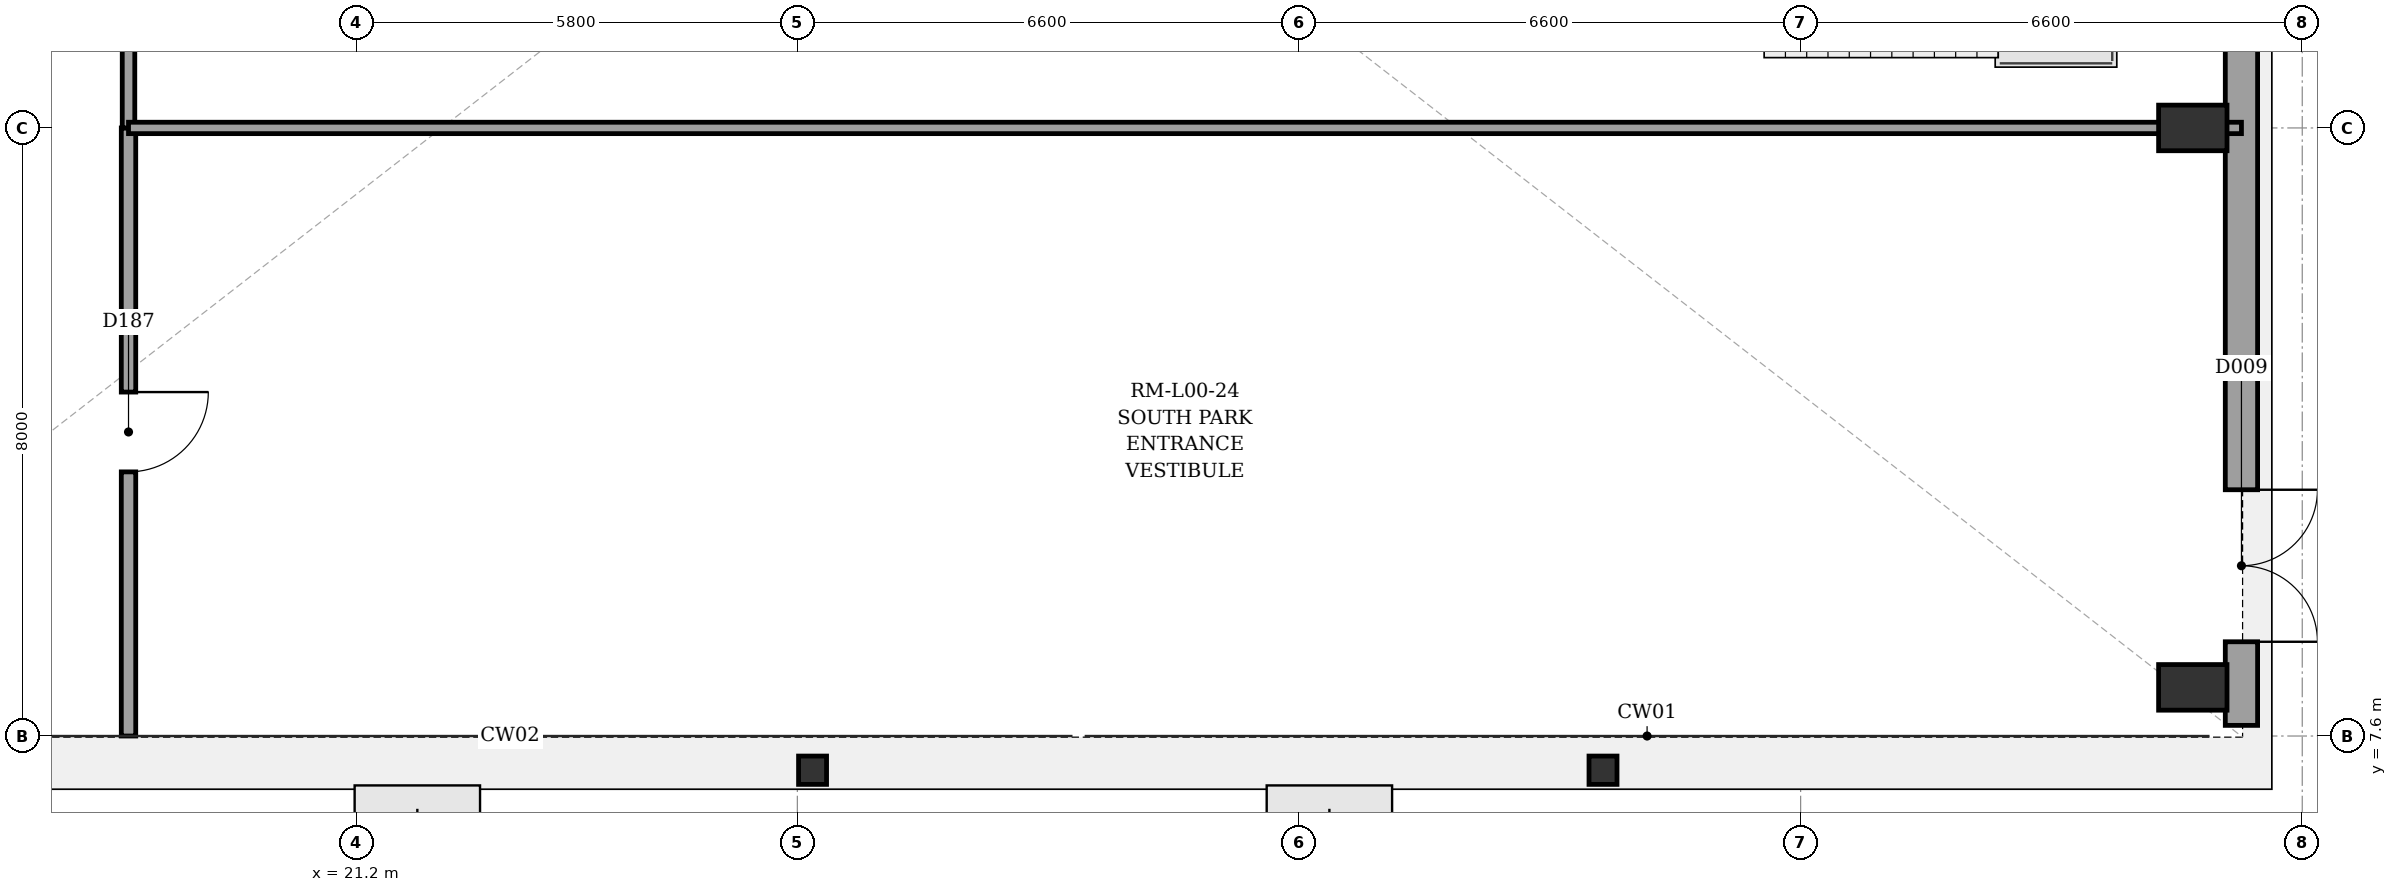
"""IFC4 building model, lengths in metres.
Left out: names, types, materials, properties, quantities, classifications, styles, units other than length and angle.
Written with IfcOpenShell. Run it as: python <this file> out.ifc"""

import sys

from ifc_helpers import new_model, si_unit, direction, frame, frame_2d, origin, origin_2d, place, context, subcontext, project, spatial, rectangle, i_section, extrude, element, fill, save


model = new_model("IFC4")
c1 = context("Model", 3, precision=1e-05, world=origin(), true_north=direction((0.0, 1.0)))
c2 = subcontext(c1, "Body", "Model", "MODEL_VIEW")
j1 = project(units=[si_unit("LENGTHUNIT", "METRE"), si_unit("PLANEANGLEUNIT", "RADIAN")], contexts=[c1])
p1 = place(None, origin())
s1 = spatial("IfcSite", under=j1, at=p1, CompositionType="ELEMENT")
p2 = place(p1, origin())
s2 = spatial("IfcBuilding", under=s1, at=p2, CompositionType="ELEMENT")
p3 = place(p2, origin())
s3 = spatial("IfcBuildingStorey", under=s2, at=p3, CompositionType="ELEMENT", Elevation=0.0)
for number, where, z_axis, x_axis in (
    (1, (45.36, 8.24, 0.0), (0.0, 0.0, 1.0), (1.0, 0.0, 0.0)),
    (2, (45.36, 15.6, 0.0), (0.0, 0.0, 1.0), (1.0, 0.0, 0.0)),
):
    element("IfcColumn", number, at=place(p3, frame(where, z_axis=z_axis, x_axis=x_axis)), inside=s3, PredefinedType="COLUMN", context=c2, shape_type="SweptSolid", body=[
        extrude(rectangle(XDim=0.6, YDim=0.9, at=origin_2d()), origin(), (0.0, 0.0, 1.0), 5.4),
    ])
for number, where, z_axis, x_axis in (
    (3, (27.2, 7.15, 0.0), (0.0, 0.0, 1.0), (1.0, 0.0, 0.0)),
    (4, (37.6, 7.15, 0.0), (0.0, 0.0, 1.0), (1.0, 0.0, 0.0)),
):
    element("IfcColumn", number, at=place(p3, frame(where, z_axis=z_axis, x_axis=x_axis)), inside=s3, PredefinedType="COLUMN", context=c2, shape_type="SweptSolid", body=[
        extrude(i_section(OverallWidth=0.373, OverallDepth=0.368, WebThickness=0.014, FlangeThickness=0.024, at=origin_2d()), origin(), (0.0, 0.0, 1.0), 5.4),
    ])
p4 = place(p3, frame((46.0, 63.46, 0.0), z_axis=(0.0, 0.0, 1.0), x_axis=(0.0, -1.0, 0.0)))
e5 = element("IfcWall", 5, at=p4, inside=s3, PredefinedType="SOLIDWALL", context=c2, shape_type="SweptSolid", body=[
    extrude(rectangle(XDim=55.72, YDim=0.425, at=frame_2d((27.86, 0.0))), origin(), (0.0, 0.0, 1.0), 5.14),
])
p5 = place(p4, frame((52.62, 0.0, 0.0)))
e6 = element("IfcOpeningElement", 6, at=p5, cuts=e5, PredefinedType="OPENING", context=c2, shape_type="SweptSolid", body=[
    extrude(rectangle(XDim=2.0, YDim=2.5, at=frame_2d((1.0, 1.25))), frame((0.0, 0.222, 0.0), z_axis=(0.0, -1.0, 0.0), x_axis=(1.0, 0.0, 0.0)), (0.0, 0.0, 1.0), 0.445),
])
p6 = place(p4, frame((10.86, 0.0, 0.0)))
e7 = element("IfcOpeningElement", 7, at=p6, cuts=e5, PredefinedType="OPENING", context=c2, shape_type="SweptSolid", body=[
    extrude(rectangle(XDim=2.0, YDim=2.5, at=frame_2d((1.0, 1.25))), frame((0.0, 0.222, 0.0), z_axis=(0.0, -1.0, 0.0), x_axis=(1.0, 0.0, 0.0)), (0.0, 0.0, 1.0), 0.445),
])
p7 = place(p3, frame((18.2, 15.6, 0.0), z_axis=(0.0, 0.0, 1.0), x_axis=(0.0, -1.0, 0.0)))
e8 = element("IfcWall", 8, at=p7, inside=s3, PredefinedType="PARTITIONING", context=c2, shape_type="SweptSolid", body=[
    extrude(rectangle(XDim=8.0, YDim=0.19, at=frame_2d((4.0, 0.0))), origin(), (0.0, 0.0, 1.0), 5.14),
])
p8 = place(p7, frame((3.475, 0.0, 0.0)))
e9 = element("IfcOpeningElement", 9, at=p8, cuts=e8, PredefinedType="OPENING", context=c2, shape_type="SweptSolid", body=[
    extrude(rectangle(XDim=1.05, YDim=2.15, at=frame_2d((0.525, 1.075))), frame((0.0, 0.105, 0.0), z_axis=(0.0, -1.0, 0.0), x_axis=(1.0, 0.0, 0.0)), (0.0, 0.0, 1.0), 0.21),
])
p9 = place(p3, frame((18.2, 31.6, 0.0), z_axis=(0.0, 0.0, 1.0), x_axis=(0.0, -1.0, 0.0)))
e10 = element("IfcWall", 10, at=p9, inside=s3, PredefinedType="PARTITIONING", context=c2, shape_type="SweptSolid", body=[
    extrude(rectangle(XDim=16.0, YDim=0.165, at=frame_2d((8.0, 0.0))), origin(), (0.0, 0.0, 1.0), 5.14),
])
p10 = place(p9, frame((5.98, 0.0, 0.0)))
e11 = element("IfcOpeningElement", 11, at=p10, cuts=e10, PredefinedType="OPENING", context=c2, shape_type="SweptSolid", body=[
    extrude(rectangle(XDim=1.04, YDim=2.2, at=frame_2d((0.52, 1.1))), frame((0.0, 0.093, 0.0), z_axis=(0.0, -1.0, 0.0), x_axis=(1.0, 0.0, 0.0)), (0.0, 0.0, 1.0), 0.185),
])
p11 = place(p9, frame((11.96, 0.0, 0.0)))
e12 = element("IfcOpeningElement", 12, at=p11, cuts=e10, PredefinedType="OPENING", context=c2, shape_type="SweptSolid", body=[
    extrude(rectangle(XDim=1.04, YDim=2.2, at=frame_2d((0.52, 1.1))), frame((0.0, 0.093, 0.0), z_axis=(0.0, -1.0, 0.0), x_axis=(1.0, 0.0, 0.0)), (0.0, 0.0, 1.0), 0.185),
])
p12 = place(p3, frame((18.2, 15.6, 0.0), z_axis=(0.0, 0.0, 1.0), x_axis=(1.0, 0.0, 0.0)))
e13 = element("IfcWall", 13, at=p12, inside=s3, PredefinedType="PARTITIONING", context=c2, shape_type="SweptSolid", body=[
    extrude(rectangle(XDim=27.8, YDim=0.15, at=frame_2d((13.9, 0.0))), origin(), (0.0, 0.0, 1.0), 4.29),
])
p13 = place(p5, origin())
e14 = element("IfcDoor", 14, at=p13, inside=s3, OperationType="DOUBLE_SWING_LEFT", PredefinedType="DOOR", context=c2, shape_type="SweptSolid", body=[
    extrude(rectangle(XDim=2.0, YDim=2.5, at=frame_2d((1.0, 1.25))), frame((0.0, 0.025, 0.0), z_axis=(0.0, -1.0, 0.0), x_axis=(1.0, 0.0, 0.0)), (0.0, 0.0, 1.0), 0.05),
])
fill(e6, e14)
p14 = place(p8, origin())
e15 = element("IfcDoor", 15, at=p14, inside=s3, OperationType="SINGLE_SWING_LEFT", PredefinedType="DOOR", context=c2, shape_type="SweptSolid", body=[
    extrude(rectangle(XDim=1.05, YDim=2.15, at=frame_2d((0.525, 1.075))), frame((0.0, 0.025, 0.0), z_axis=(0.0, -1.0, 0.0), x_axis=(1.0, 0.0, 0.0)), (0.0, 0.0, 1.0), 0.05),
])
fill(e9, e15)
save(model, sys.argv[1])
